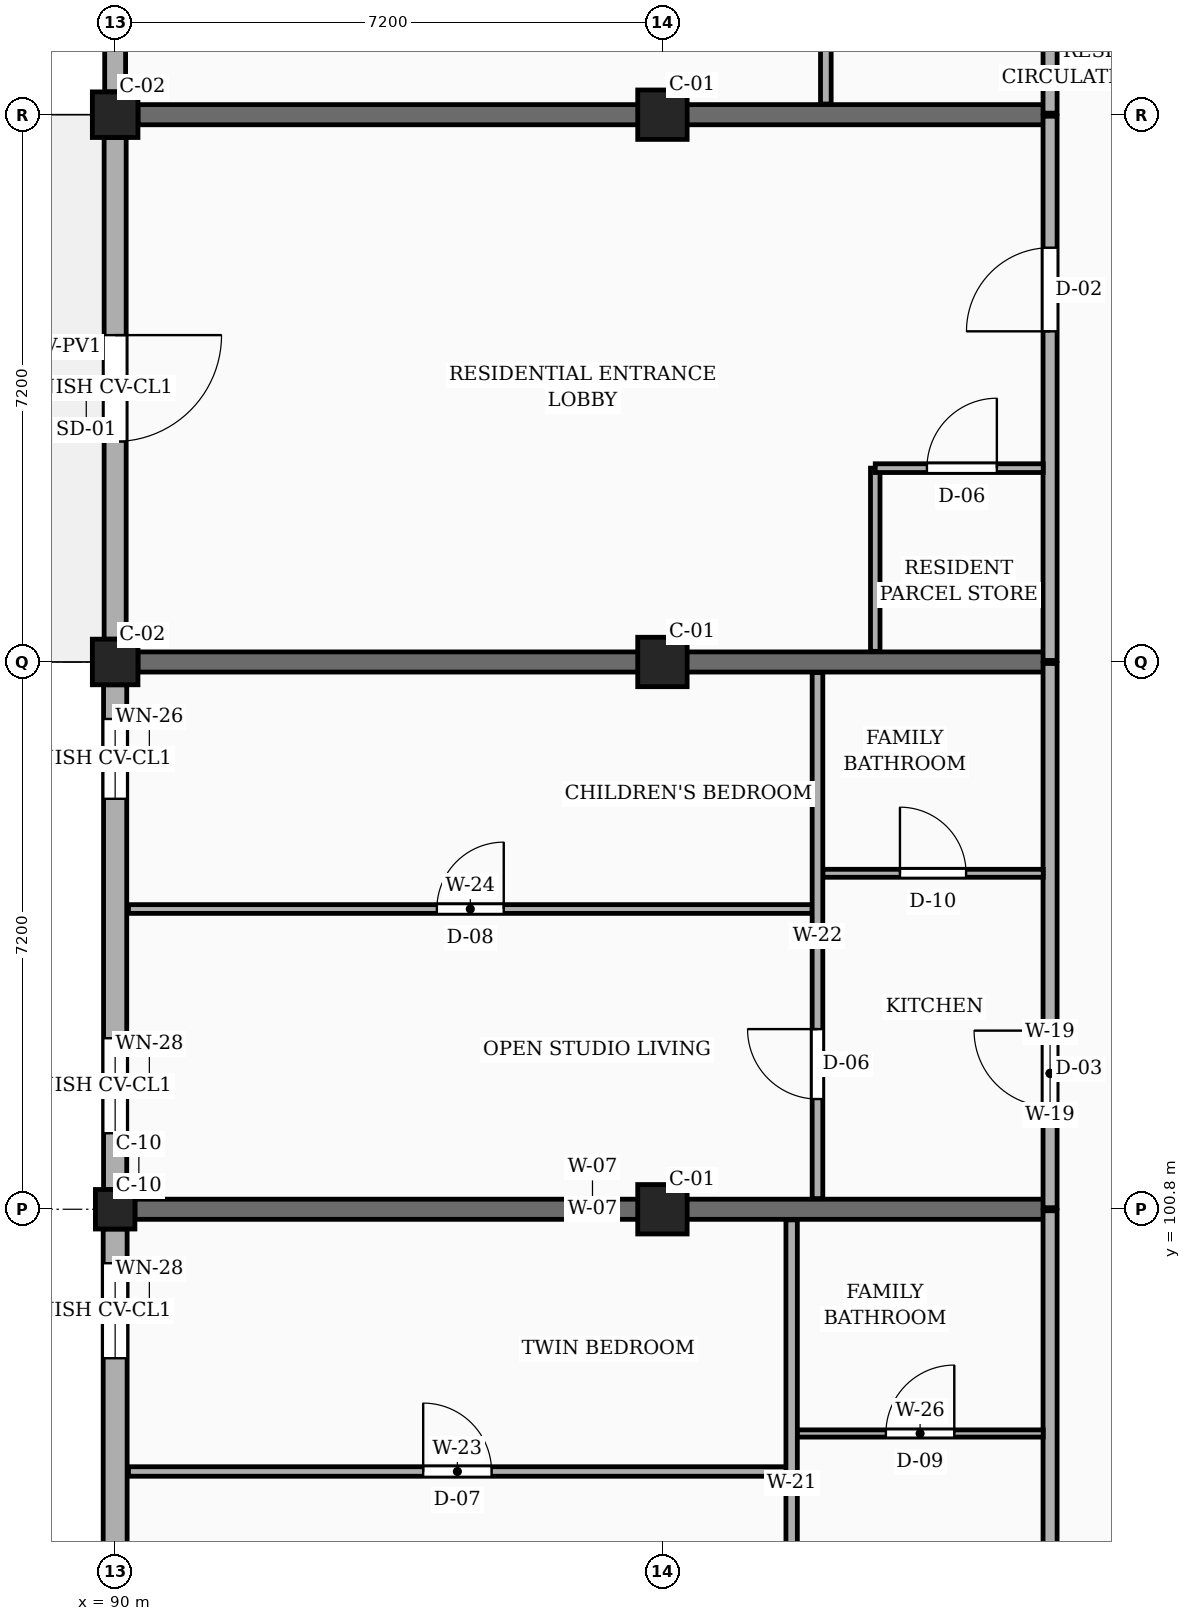
"""IFC4 building model, lengths in metres.
Left out: names, types, materials, properties, quantities, classifications, styles, units other than length and angle.
Written with IfcOpenShell. Run it as: python <this file> out.ifc"""

import sys

from ifc_helpers import new_model, si_unit, direction, frame, frame_2d, origin, origin_2d, place, context, subcontext, project, spatial, rectangle, circle, extrude, element, fill, save


model = new_model("IFC4")
c1 = context("Model", 3, precision=1e-05, world=origin(), true_north=direction((0.0, 1.0)))
c2 = subcontext(c1, "Body", "Model", "MODEL_VIEW")
j1 = project(units=[si_unit("LENGTHUNIT", "METRE"), si_unit("PLANEANGLEUNIT", "RADIAN")], contexts=[c1])
p1 = place(None, origin())
s1 = spatial("IfcSite", under=j1, at=p1, CompositionType="ELEMENT")
p2 = place(p1, origin())
s2 = spatial("IfcBuilding", under=s1, at=p2, CompositionType="ELEMENT")
p3 = place(p2, origin())
s3 = spatial("IfcBuildingStorey", under=s2, at=p3, CompositionType="ELEMENT", Elevation=0.0)
p4 = place(p3, frame((90.0, 100.8, 0.0), z_axis=(0.0, 0.0, 1.0), x_axis=(1.0, 0.0, 0.0)))
e1 = element("IfcColumn", 1, at=p4, inside=s3, PredefinedType="COLUMN", context=c2, shape_type="SweptSolid", body=[
    extrude(circle(Radius=0.26, at=origin_2d()), origin(), (0.0, 0.0, 1.0), 4.5),
])
for number, where, z_axis, x_axis in (
    (2, (90.0, 108.0, 0.0), (0.0, 0.0, 1.0), (1.0, 0.0, 0.0)),
    (3, (90.0, 115.2, 0.0), (0.0, 0.0, 1.0), (1.0, 0.0, 0.0)),
):
    element("IfcColumn", number, at=place(p3, frame(where, z_axis=z_axis, x_axis=x_axis)), inside=s3, PredefinedType="COLUMN", context=c2, shape_type="SweptSolid", body=[
        extrude(rectangle(XDim=0.6, YDim=0.6, at=origin_2d()), origin(), (0.0, 0.0, 1.0), 4.5),
    ])
for number, where, z_axis, x_axis in (
    (4, (97.2, 100.8, 0.0), (0.0, 0.0, 1.0), (1.0, 0.0, 0.0)),
    (5, (97.2, 108.0, 0.0), (0.0, 0.0, 1.0), (1.0, 0.0, 0.0)),
    (6, (97.2, 115.2, 0.0), (0.0, 0.0, 1.0), (1.0, 0.0, 0.0)),
):
    element("IfcColumn", number, at=place(p3, frame(where, z_axis=z_axis, x_axis=x_axis)), inside=s3, PredefinedType="COLUMN", context=c2, shape_type="SweptSolid", body=[
        extrude(rectangle(XDim=0.65, YDim=0.65, at=origin_2d()), origin(), (0.0, 0.0, 1.0), 4.5),
    ])
p5 = place(p3, frame((90.26, 100.8, 0.0), z_axis=(0.0, 0.0, 1.0), x_axis=(1.0, 0.0, 0.0)))
e7 = element("IfcWall", 7, at=p5, inside=s3, PredefinedType="SOLIDWALL", context=c2, shape_type="SweptSolid", body=[
    extrude(rectangle(XDim=12.04, YDim=0.265, at=frame_2d((6.02, 0.0))), origin(), (0.0, 0.0, 1.0), 3.54),
])
for number, where, z_axis, x_axis in (
    (8, (90.3, 108.0, 0.0), (0.0, 0.0, 1.0), (1.0, 0.0, 0.0)),
    (9, (90.3, 115.2, 0.0), (0.0, 0.0, 1.0), (1.0, 0.0, 0.0)),
):
    element("IfcWall", number, at=place(p3, frame(where, z_axis=z_axis, x_axis=x_axis)), inside=s3, PredefinedType="SOLIDWALL", context=c2, shape_type="SweptSolid", body=[
        extrude(rectangle(XDim=12.0, YDim=0.265, at=frame_2d((6.0, 0.0))), origin(), (0.0, 0.0, 1.0), 3.54),
    ])
p6 = place(p3, frame((90.0, 122.1, 0.0), z_axis=(0.0, 0.0, 1.0), x_axis=(0.0, -1.0, 0.0)))
e10 = element("IfcWall", 10, at=p6, inside=s3, PredefinedType="SOLIDWALL", context=c2, shape_type="SweptSolid", body=[
    extrude(rectangle(XDim=6.6, YDim=0.275, at=frame_2d((3.3, 0.0))), origin(), (0.0, 0.0, 1.0), 3.81),
])
p7 = place(p6, frame((0.45, 0.0, 0.78)))
e11 = element("IfcOpeningElement", 11, at=p7, cuts=e10, PredefinedType="OPENING", context=c2, shape_type="SweptSolid", body=[
    extrude(rectangle(XDim=1.46, YDim=1.36, at=frame_2d((0.73, 0.68))), frame((0.0, 0.147, 0.0), z_axis=(0.0, -1.0, 0.0), x_axis=(1.0, 0.0, 0.0)), (0.0, 0.0, 1.0), 0.295),
])
p8 = place(p6, frame((4.65, 0.0, 0.78)))
e12 = element("IfcOpeningElement", 12, at=p8, cuts=e10, PredefinedType="OPENING", context=c2, shape_type="SweptSolid", body=[
    extrude(rectangle(XDim=1.05, YDim=1.44, at=frame_2d((0.525, 0.72))), frame((0.0, 0.147, 0.0), z_axis=(0.0, -1.0, 0.0), x_axis=(1.0, 0.0, 0.0)), (0.0, 0.0, 1.0), 0.295),
])
p9 = place(p3, frame((90.0, 114.9, 0.0), z_axis=(0.0, 0.0, 1.0), x_axis=(0.0, -1.0, 0.0)))
e13 = element("IfcWall", 13, at=p9, inside=s3, PredefinedType="SOLIDWALL", context=c2, shape_type="SweptSolid", body=[
    extrude(rectangle(XDim=6.6, YDim=0.29, at=frame_2d((3.3, 0.0))), origin(), (0.0, 0.0, 1.0), 3.81),
])
p10 = place(p9, frame((2.6, 0.0, 0.0)))
e14 = element("IfcOpeningElement", 14, at=p10, cuts=e13, PredefinedType="OPENING", context=c2, shape_type="SweptSolid", body=[
    extrude(rectangle(XDim=1.4, YDim=2.2, at=frame_2d((0.7, 1.1))), frame((0.0, 0.155, 0.0), z_axis=(0.0, -1.0, 0.0), x_axis=(1.0, 0.0, 0.0)), (0.0, 0.0, 1.0), 0.31),
])
p11 = place(p3, frame((90.0, 107.7, 0.0), z_axis=(0.0, 0.0, 1.0), x_axis=(0.0, -1.0, 0.0)))
e15 = element("IfcWall", 15, at=p11, inside=s3, PredefinedType="SOLIDWALL", context=c2, shape_type="SweptSolid", body=[
    extrude(rectangle(XDim=6.64, YDim=0.305, at=frame_2d((3.32, 0.0))), origin(), (0.0, 0.0, 1.0), 3.81),
])
p12 = place(p11, frame((0.45, 0.0, 0.78)))
e16 = element("IfcOpeningElement", 16, at=p12, cuts=e15, PredefinedType="OPENING", context=c2, shape_type="SweptSolid", body=[
    extrude(rectangle(XDim=1.05, YDim=1.44, at=frame_2d((0.525, 0.72))), frame((0.0, 0.163, 0.0), z_axis=(0.0, -1.0, 0.0), x_axis=(1.0, 0.0, 0.0)), (0.0, 0.0, 1.0), 0.325),
])
p13 = place(p11, frame((4.65, 0.0, 0.78)))
e17 = element("IfcOpeningElement", 17, at=p13, cuts=e15, PredefinedType="OPENING", context=c2, shape_type="SweptSolid", body=[
    extrude(rectangle(XDim=1.25, YDim=1.44, at=frame_2d((0.625, 0.72))), frame((0.0, 0.163, 0.0), z_axis=(0.0, -1.0, 0.0), x_axis=(1.0, 0.0, 0.0)), (0.0, 0.0, 1.0), 0.325),
])
p14 = place(p3, frame((90.0, 100.54, 0.0), z_axis=(0.0, 0.0, 1.0), x_axis=(0.0, -1.0, 0.0)))
e18 = element("IfcWall", 18, at=p14, inside=s3, PredefinedType="SOLIDWALL", context=c2, shape_type="SweptSolid", body=[
    extrude(rectangle(XDim=6.64, YDim=0.315, at=frame_2d((3.32, 0.0))), origin(), (0.0, 0.0, 1.0), 3.81),
])
p15 = place(p14, frame((0.45, 0.0, 0.78)))
e19 = element("IfcOpeningElement", 19, at=p15, cuts=e18, PredefinedType="OPENING", context=c2, shape_type="SweptSolid", body=[
    extrude(rectangle(XDim=1.25, YDim=1.44, at=frame_2d((0.625, 0.72))), frame((0.0, 0.167, 0.0), z_axis=(0.0, -1.0, 0.0), x_axis=(1.0, 0.0, 0.0)), (0.0, 0.0, 1.0), 0.335),
])
p16 = place(p14, frame((4.65, 0.0, 0.78)))
e20 = element("IfcOpeningElement", 20, at=p16, cuts=e18, PredefinedType="OPENING", context=c2, shape_type="SweptSolid", body=[
    extrude(rectangle(XDim=1.45, YDim=1.44, at=frame_2d((0.725, 0.72))), frame((0.0, 0.167, 0.0), z_axis=(0.0, -1.0, 0.0), x_axis=(1.0, 0.0, 0.0)), (0.0, 0.0, 1.0), 0.335),
])
p17 = place(p3, frame((102.3, 93.62, 0.0), z_axis=(0.0, 0.0, 1.0), x_axis=(0.0, 1.0, 0.0)))
e21 = element("IfcWall", 21, at=p17, inside=s3, PredefinedType="PARTITIONING", context=c2, shape_type="SweptSolid", body=[
    extrude(rectangle(XDim=7.16, YDim=0.185, at=frame_2d((3.58, 0.0))), origin(), (0.0, 0.0, 1.0), 3.675),
])
p18 = place(p17, frame((1.33, 0.0, 0.0)))
e22 = element("IfcOpeningElement", 22, at=p18, cuts=e21, PredefinedType="OPENING", context=c2, shape_type="SweptSolid", body=[
    extrude(rectangle(XDim=1.14, YDim=2.18, at=frame_2d((0.57, 1.09))), frame((0.0, 0.103, 0.0), z_axis=(0.0, -1.0, 0.0), x_axis=(1.0, 0.0, 0.0)), (0.0, 0.0, 1.0), 0.205),
])
p19 = place(p3, frame((102.3, 100.82, 0.0), z_axis=(0.0, 0.0, 1.0), x_axis=(0.0, 1.0, 0.0)))
e23 = element("IfcWall", 23, at=p19, inside=s3, PredefinedType="PARTITIONING", context=c2, shape_type="SweptSolid", body=[
    extrude(rectangle(XDim=7.16, YDim=0.185, at=frame_2d((3.58, 0.0))), origin(), (0.0, 0.0, 1.0), 3.675),
])
p20 = place(p19, frame((1.33, 0.0, 0.0)))
e24 = element("IfcOpeningElement", 24, at=p20, cuts=e23, PredefinedType="OPENING", context=c2, shape_type="SweptSolid", body=[
    extrude(rectangle(XDim=1.0, YDim=2.15, at=frame_2d((0.5, 1.075))), frame((0.0, 0.103, 0.0), z_axis=(0.0, -1.0, 0.0), x_axis=(1.0, 0.0, 0.0)), (0.0, 0.0, 1.0), 0.205),
])
p21 = place(p3, frame((102.3, 108.02, 0.0), z_axis=(0.0, 0.0, 1.0), x_axis=(0.0, 1.0, 0.0)))
e25 = element("IfcWall", 25, at=p21, inside=s3, PredefinedType="PARTITIONING", context=c2, shape_type="SweptSolid", body=[
    extrude(rectangle(XDim=7.16, YDim=0.185, at=frame_2d((3.58, 0.0))), origin(), (0.0, 0.0, 1.0), 3.675),
])
p22 = place(p21, frame((4.33, 0.0, 0.0)))
e26 = element("IfcOpeningElement", 26, at=p22, cuts=e25, PredefinedType="OPENING", context=c2, shape_type="SweptSolid", body=[
    extrude(rectangle(XDim=1.1, YDim=2.15, at=frame_2d((0.55, 1.075))), frame((0.0, 0.103, 0.0), z_axis=(0.0, -1.0, 0.0), x_axis=(1.0, 0.0, 0.0)), (0.0, 0.0, 1.0), 0.205),
])
p23 = place(p3, frame((102.3, 115.22, 0.0), z_axis=(0.0, 0.0, 1.0), x_axis=(0.0, 1.0, 0.0)))
e27 = element("IfcWall", 27, at=p23, inside=s3, PredefinedType="PARTITIONING", context=c2, shape_type="SweptSolid", body=[
    extrude(rectangle(XDim=7.16, YDim=0.185, at=frame_2d((3.58, 0.0))), origin(), (0.0, 0.0, 1.0), 3.675),
])
p24 = place(p23, frame((1.33, 0.0, 0.0)))
e28 = element("IfcOpeningElement", 28, at=p24, cuts=e27, PredefinedType="OPENING", context=c2, shape_type="SweptSolid", body=[
    extrude(rectangle(XDim=1.14, YDim=2.18, at=frame_2d((0.57, 1.09))), frame((0.0, 0.103, 0.0), z_axis=(0.0, -1.0, 0.0), x_axis=(1.0, 0.0, 0.0)), (0.0, 0.0, 1.0), 0.205),
])
p25 = place(p3, frame((90.175, 97.35, 0.0), z_axis=(0.0, 0.0, 1.0), x_axis=(1.0, 0.0, 0.0)))
e29 = element("IfcWall", 29, at=p25, inside=s3, PredefinedType="PARTITIONING", context=c2, shape_type="SweptSolid", body=[
    extrude(rectangle(XDim=8.655, YDim=0.125, at=frame_2d((4.328, 0.0))), origin(), (0.0, 0.0, 1.0), 3.675),
])
p26 = place(p25, frame((3.877, 0.0, 0.0)))
e30 = element("IfcOpeningElement", 30, at=p26, cuts=e29, PredefinedType="OPENING", context=c2, shape_type="SweptSolid", body=[
    extrude(rectangle(XDim=0.9, YDim=2.1, at=frame_2d((0.45, 1.05))), frame((0.0, 0.073, 0.0), z_axis=(0.0, -1.0, 0.0), x_axis=(1.0, 0.0, 0.0)), (0.0, 0.0, 1.0), 0.145),
])
p27 = place(p3, frame((98.97, 97.85, 0.0), z_axis=(0.0, 0.0, 1.0), x_axis=(1.0, 0.0, 0.0)))
e31 = element("IfcWall", 31, at=p27, inside=s3, PredefinedType="PARTITIONING", context=c2, shape_type="SweptSolid", body=[
    extrude(rectangle(XDim=3.24, YDim=0.095, at=frame_2d((1.62, 0.0))), origin(), (0.0, 0.0, 1.0), 3.675),
])
p28 = place(p27, frame((1.17, 0.0, 0.0)))
e32 = element("IfcOpeningElement", 32, at=p28, cuts=e31, PredefinedType="OPENING", context=c2, shape_type="SweptSolid", body=[
    extrude(rectangle(XDim=0.9, YDim=2.05, at=frame_2d((0.45, 1.025))), frame((0.0, 0.058, 0.0), z_axis=(0.0, -1.0, 0.0), x_axis=(1.0, 0.0, 0.0)), (0.0, 0.0, 1.0), 0.115),
])
p29 = place(p3, frame((98.9, 93.74, 0.0), z_axis=(0.0, 0.0, 1.0), x_axis=(0.0, 1.0, 0.0)))
e33 = element("IfcWall", 33, at=p29, inside=s3, PredefinedType="PARTITIONING", context=c2, shape_type="SweptSolid", body=[
    extrude(rectangle(XDim=6.92, YDim=0.15, at=frame_2d((3.46, 0.0))), origin(), (0.0, 0.0, 1.0), 3.675),
])
p30 = place(p29, frame((1.31, 0.0, 0.0)))
e34 = element("IfcOpeningElement", 34, at=p30, cuts=e33, PredefinedType="OPENING", context=c2, shape_type="SweptSolid", body=[
    extrude(rectangle(XDim=0.95, YDim=2.1, at=frame_2d((0.475, 1.05))), frame((0.0, 0.085, 0.0), z_axis=(0.0, -1.0, 0.0), x_axis=(1.0, 0.0, 0.0)), (0.0, 0.0, 1.0), 0.17),
])
p31 = place(p3, frame((90.175, 104.75, 0.0), z_axis=(0.0, 0.0, 1.0), x_axis=(1.0, 0.0, 0.0)))
e35 = element("IfcWall", 35, at=p31, inside=s3, PredefinedType="PARTITIONING", context=c2, shape_type="SweptSolid", body=[
    extrude(rectangle(XDim=8.995, YDim=0.115, at=frame_2d((4.498, 0.0))), origin(), (0.0, 0.0, 1.0), 3.675),
])
p32 = place(p31, frame((4.058, 0.0, 0.0)))
e36 = element("IfcOpeningElement", 36, at=p32, cuts=e35, PredefinedType="OPENING", context=c2, shape_type="SweptSolid", body=[
    extrude(rectangle(XDim=0.88, YDim=2.08, at=frame_2d((0.44, 1.04))), frame((0.0, 0.067, 0.0), z_axis=(0.0, -1.0, 0.0), x_axis=(1.0, 0.0, 0.0)), (0.0, 0.0, 1.0), 0.135),
])
p33 = place(p3, frame((99.31, 105.22, 0.0), z_axis=(0.0, 0.0, 1.0), x_axis=(1.0, 0.0, 0.0)))
e37 = element("IfcWall", 37, at=p33, inside=s3, PredefinedType="PARTITIONING", context=c2, shape_type="SweptSolid", body=[
    extrude(rectangle(XDim=2.9, YDim=0.105, at=frame_2d((1.45, 0.0))), origin(), (0.0, 0.0, 1.0), 3.675),
])
p34 = place(p33, frame((1.015, 0.0, 0.0)))
e38 = element("IfcOpeningElement", 38, at=p34, cuts=e37, PredefinedType="OPENING", context=c2, shape_type="SweptSolid", body=[
    extrude(rectangle(XDim=0.87, YDim=2.05, at=frame_2d((0.435, 1.025))), frame((0.0, 0.062, 0.0), z_axis=(0.0, -1.0, 0.0), x_axis=(1.0, 0.0, 0.0)), (0.0, 0.0, 1.0), 0.125),
])
p35 = place(p3, frame((99.24, 100.94, 0.0), z_axis=(0.0, 0.0, 1.0), x_axis=(0.0, 1.0, 0.0)))
e39 = element("IfcWall", 39, at=p35, inside=s3, PredefinedType="PARTITIONING", context=c2, shape_type="SweptSolid", body=[
    extrude(rectangle(XDim=6.92, YDim=0.14, at=frame_2d((3.46, 0.0))), origin(), (0.0, 0.0, 1.0), 3.675),
])
p36 = place(p35, frame((1.31, 0.0, 0.0)))
e40 = element("IfcOpeningElement", 40, at=p36, cuts=e39, PredefinedType="OPENING", context=c2, shape_type="SweptSolid", body=[
    extrude(rectangle(XDim=0.92, YDim=2.1, at=frame_2d((0.46, 1.05))), frame((0.0, 0.08, 0.0), z_axis=(0.0, -1.0, 0.0), x_axis=(1.0, 0.0, 0.0)), (0.0, 0.0, 1.0), 0.16),
])
p37 = place(p3, frame((100.0, 108.14, 0.0), z_axis=(0.0, 0.0, 1.0), x_axis=(0.0, 1.0, 0.0)))
e41 = element("IfcWall", 41, at=p37, inside=s3, PredefinedType="PARTITIONING", context=c2, shape_type="SweptSolid", body=[
    extrude(rectangle(XDim=2.41, YDim=0.125, at=frame_2d((1.205, 0.0))), origin(), (0.0, 0.0, 1.0), 3.675),
])
p38 = place(p3, frame((100.0, 110.55, 0.0), z_axis=(0.0, 0.0, 1.0), x_axis=(1.0, 0.0, 0.0)))
e42 = element("IfcWall", 42, at=p38, inside=s3, PredefinedType="PARTITIONING", context=c2, shape_type="SweptSolid", body=[
    extrude(rectangle(XDim=2.21, YDim=0.115, at=frame_2d((1.105, 0.0))), origin(), (0.0, 0.0, 1.0), 3.675),
])
p39 = place(p38, frame((0.68, 0.0, 0.0)))
e43 = element("IfcOpeningElement", 43, at=p39, cuts=e42, PredefinedType="OPENING", context=c2, shape_type="SweptSolid", body=[
    extrude(rectangle(XDim=0.92, YDim=2.1, at=frame_2d((0.46, 1.05))), frame((0.0, 0.067, 0.0), z_axis=(0.0, -1.0, 0.0), x_axis=(1.0, 0.0, 0.0)), (0.0, 0.0, 1.0), 0.135),
])
p40 = place(p3, frame((99.35, 115.34, 0.0), z_axis=(0.0, 0.0, 1.0), x_axis=(0.0, 1.0, 0.0)))
e44 = element("IfcWall", 44, at=p40, inside=s3, PredefinedType="PARTITIONING", context=c2, shape_type="SweptSolid", body=[
    extrude(rectangle(XDim=6.92, YDim=0.14, at=frame_2d((3.46, 0.0))), origin(), (0.0, 0.0, 1.0), 3.675),
])
p41 = place(p40, frame((1.31, 0.0, 0.0)))
e45 = element("IfcOpeningElement", 45, at=p41, cuts=e44, PredefinedType="OPENING", context=c2, shape_type="SweptSolid", body=[
    extrude(rectangle(XDim=0.95, YDim=2.1, at=frame_2d((0.475, 1.05))), frame((0.0, 0.08, 0.0), z_axis=(0.0, -1.0, 0.0), x_axis=(1.0, 0.0, 0.0)), (0.0, 0.0, 1.0), 0.16),
])
p42 = place(p10, frame((1.4, 0.0, 0.0), z_axis=(0.0, 0.0, 1.0), x_axis=(-1.0, 0.0, 0.0)))
e46 = element("IfcDoor", 46, at=p42, inside=s3, OperationType="SINGLE_SWING_LEFT", PredefinedType="DOOR", context=c2, shape_type="SweptSolid", body=[
    extrude(rectangle(XDim=1.4, YDim=2.2, at=frame_2d((0.7, 1.1))), frame((0.0, 0.025, 0.0), z_axis=(0.0, -1.0, 0.0), x_axis=(1.0, 0.0, 0.0)), (0.0, 0.0, 1.0), 0.05),
])
fill(e14, e46)
p43 = place(p12, origin())
e47 = element("IfcWindow", 47, at=p43, inside=s3, PartitioningType="SINGLE_PANEL", PredefinedType="WINDOW", context=c2, shape_type="SweptSolid", body=[
    extrude(rectangle(XDim=1.05, YDim=1.44, at=frame_2d((0.525, 0.72))), frame((0.0, 0.03, 0.0), z_axis=(0.0, -1.0, 0.0), x_axis=(1.0, 0.0, 0.0)), (0.0, 0.0, 1.0), 0.06),
])
fill(e16, e47)
p44 = place(p13, origin())
e48 = element("IfcWindow", 48, at=p44, inside=s3, PartitioningType="SINGLE_PANEL", PredefinedType="WINDOW", context=c2, shape_type="SweptSolid", body=[
    extrude(rectangle(XDim=1.25, YDim=1.44, at=frame_2d((0.625, 0.72))), frame((0.0, 0.03, 0.0), z_axis=(0.0, -1.0, 0.0), x_axis=(1.0, 0.0, 0.0)), (0.0, 0.0, 1.0), 0.06),
])
fill(e17, e48)
p45 = place(p15, origin())
e49 = element("IfcWindow", 49, at=p45, inside=s3, PartitioningType="SINGLE_PANEL", PredefinedType="WINDOW", context=c2, shape_type="SweptSolid", body=[
    extrude(rectangle(XDim=1.25, YDim=1.44, at=frame_2d((0.625, 0.72))), frame((0.0, 0.03, 0.0), z_axis=(0.0, -1.0, 0.0), x_axis=(1.0, 0.0, 0.0)), (0.0, 0.0, 1.0), 0.06),
])
fill(e19, e49)
p46 = place(p20, origin())
e50 = element("IfcDoor", 50, at=p46, inside=s3, OperationType="SINGLE_SWING_RIGHT", PredefinedType="DOOR", context=c2, shape_type="SweptSolid", body=[
    extrude(rectangle(XDim=1.0, YDim=2.15, at=frame_2d((0.5, 1.075))), frame((0.0, 0.025, 0.0), z_axis=(0.0, -1.0, 0.0), x_axis=(1.0, 0.0, 0.0)), (0.0, 0.0, 1.0), 0.05),
])
fill(e24, e50)
p47 = place(p22, origin())
e51 = element("IfcDoor", 51, at=p47, inside=s3, OperationType="SINGLE_SWING_LEFT", PredefinedType="DOOR", context=c2, shape_type="SweptSolid", body=[
    extrude(rectangle(XDim=1.1, YDim=2.15, at=frame_2d((0.55, 1.075))), frame((0.0, 0.025, 0.0), z_axis=(0.0, -1.0, 0.0), x_axis=(1.0, 0.0, 0.0)), (0.0, 0.0, 1.0), 0.05),
])
fill(e26, e51)
p48 = place(p26, origin())
e52 = element("IfcDoor", 52, at=p48, inside=s3, OperationType="SINGLE_SWING_LEFT", PredefinedType="DOOR", context=c2, shape_type="SweptSolid", body=[
    extrude(rectangle(XDim=0.9, YDim=2.1, at=frame_2d((0.45, 1.05))), frame((0.0, 0.025, 0.0), z_axis=(0.0, -1.0, 0.0), x_axis=(1.0, 0.0, 0.0)), (0.0, 0.0, 1.0), 0.05),
])
fill(e30, e52)
p49 = place(p28, origin())
e53 = element("IfcDoor", 53, at=p49, inside=s3, OperationType="SINGLE_SWING_RIGHT", PredefinedType="DOOR", context=c2, shape_type="SweptSolid", body=[
    extrude(rectangle(XDim=0.9, YDim=2.05, at=frame_2d((0.45, 1.025))), frame((0.0, 0.025, 0.0), z_axis=(0.0, -1.0, 0.0), x_axis=(1.0, 0.0, 0.0)), (0.0, 0.0, 1.0), 0.05),
])
fill(e32, e53)
p50 = place(p32, origin())
e54 = element("IfcDoor", 54, at=p50, inside=s3, OperationType="SINGLE_SWING_RIGHT", PredefinedType="DOOR", context=c2, shape_type="SweptSolid", body=[
    extrude(rectangle(XDim=0.88, YDim=2.08, at=frame_2d((0.44, 1.04))), frame((0.0, 0.025, 0.0), z_axis=(0.0, -1.0, 0.0), x_axis=(1.0, 0.0, 0.0)), (0.0, 0.0, 1.0), 0.05),
])
fill(e36, e54)
p51 = place(p34, origin())
e55 = element("IfcDoor", 55, at=p51, inside=s3, OperationType="SINGLE_SWING_LEFT", PredefinedType="DOOR", context=c2, shape_type="SweptSolid", body=[
    extrude(rectangle(XDim=0.87, YDim=2.05, at=frame_2d((0.435, 1.025))), frame((0.0, 0.025, 0.0), z_axis=(0.0, -1.0, 0.0), x_axis=(1.0, 0.0, 0.0)), (0.0, 0.0, 1.0), 0.05),
])
fill(e38, e55)
p52 = place(p36, origin())
e56 = element("IfcDoor", 56, at=p52, inside=s3, OperationType="SINGLE_SWING_RIGHT", PredefinedType="DOOR", context=c2, shape_type="SweptSolid", body=[
    extrude(rectangle(XDim=0.92, YDim=2.1, at=frame_2d((0.46, 1.05))), frame((0.0, 0.025, 0.0), z_axis=(0.0, -1.0, 0.0), x_axis=(1.0, 0.0, 0.0)), (0.0, 0.0, 1.0), 0.05),
])
fill(e40, e56)
p53 = place(p39, origin())
e57 = element("IfcDoor", 57, at=p53, inside=s3, OperationType="SINGLE_SWING_RIGHT", PredefinedType="DOOR", context=c2, shape_type="SweptSolid", body=[
    extrude(rectangle(XDim=0.92, YDim=2.1, at=frame_2d((0.46, 1.05))), frame((0.0, 0.025, 0.0), z_axis=(0.0, -1.0, 0.0), x_axis=(1.0, 0.0, 0.0)), (0.0, 0.0, 1.0), 0.05),
])
fill(e43, e57)
save(model, sys.argv[1])
